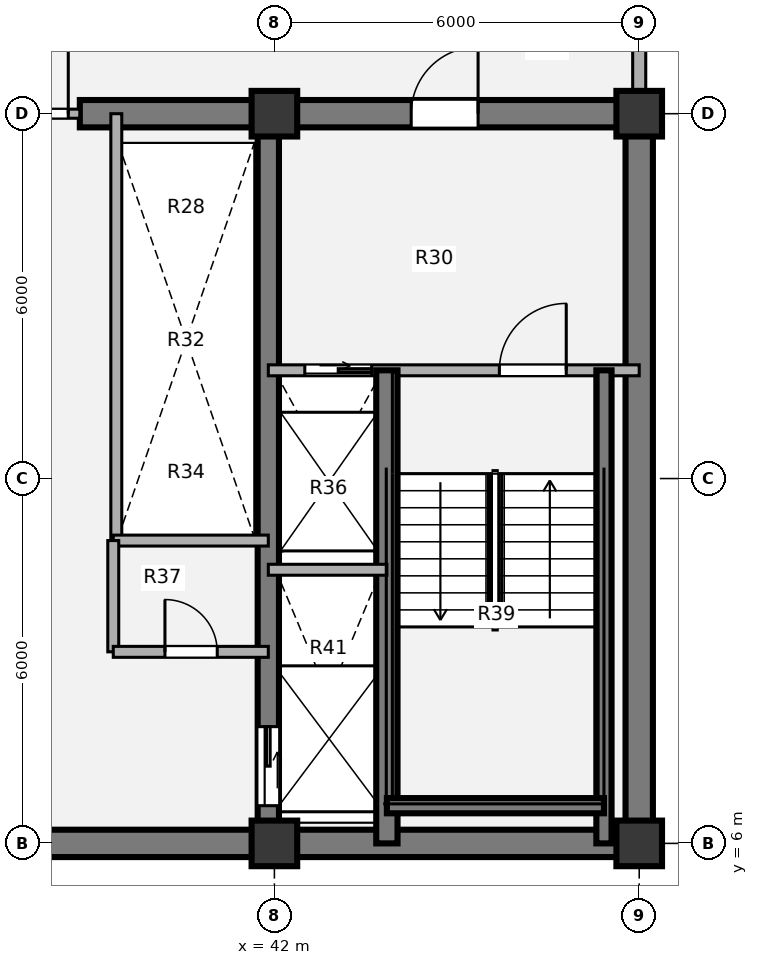
"""IFC4 building model, lengths in metres.
Left out: names, types, materials, properties, quantities, classifications, styles, units other than length and angle.
Written with IfcOpenShell. Run it as: python <this file> out.ifc"""

import sys

from ifc_helpers import new_model, si_unit, direction, frame, frame_2d, origin, origin_2d, place, context, subcontext, project, spatial, rectangle, extrude, source, transform, mapped, element, fill, save


model = new_model("IFC4")
c1 = context("Model", 3, precision=1e-05, world=origin(), true_north=direction((0.0, 1.0)))
c2 = subcontext(c1, "Body", "Model", "MODEL_VIEW")
j1 = project(units=[si_unit("LENGTHUNIT", "METRE"), si_unit("PLANEANGLEUNIT", "RADIAN")], contexts=[c1])
p1 = place(None, origin())
s1 = spatial("IfcSite", under=j1, at=p1, CompositionType="ELEMENT")
p2 = place(p1, origin())
s2 = spatial("IfcBuilding", under=s1, at=p2, CompositionType="ELEMENT")
p3 = place(p2, frame((0.0, 0.0, 194.22)))
s3 = spatial("IfcBuildingStorey", under=s2, at=p3, CompositionType="ELEMENT", Elevation=194.22)
m1 = source(origin(), c2, "Body", "SweptSolid", [
    extrude(rectangle(XDim=0.75, YDim=0.75, at=origin_2d()), origin(), (0.0, 0.0, 1.0), 3.78),
])
for number, where, z_axis, x_axis in (
    (1, (42.0, 6.0, 0.0), (0.0, 0.0, 1.0), (1.0, 0.0, 0.0)),
    (2, (48.0, 6.0, 0.0), (0.0, 0.0, 1.0), (1.0, 0.0, 0.0)),
    (3, (42.0, 18.0, 0.0), (0.0, 0.0, 1.0), (1.0, 0.0, 0.0)),
    (4, (48.0, 18.0, 0.0), (0.0, 0.0, 1.0), (1.0, 0.0, 0.0)),
):
    element("IfcColumn", number, at=place(p3, frame(where, z_axis=z_axis, x_axis=x_axis)), inside=s3, PredefinedType="COLUMN", context=c2, shape_type="MappedRepresentation", body=[
        mapped(m1, transform((0.0, 0.0, 0.0), x_axis=(1.0, 0.0, 0.0), y_axis=(0.0, 1.0, 0.0), z_axis=(0.0, 0.0, 1.0), scale=1.0)),
    ])
p4 = place(p3, frame((48.225, 6.0, 0.0), z_axis=(0.0, 0.0, 1.0), x_axis=(-1.0, 0.0, 0.0)))
e5 = element("IfcWall", 5, at=p4, inside=s3, PredefinedType="SHEAR", context=c2, shape_type="SweptSolid", body=[
    extrude(rectangle(XDim=24.45, YDim=0.45, at=frame_2d((12.225, 0.0))), origin(), (0.0, 0.0, 1.0), 3.78),
])
p5 = place(p3, frame((48.0, 18.0, 0.0), z_axis=(0.0, 0.0, 1.0), x_axis=(0.0, -1.0, 0.0)))
e6 = element("IfcWall", 6, at=p5, inside=s3, PredefinedType="SHEAR", context=c2, shape_type="SweptSolid", body=[
    extrude(rectangle(XDim=12.0, YDim=0.45, at=frame_2d((6.0, 0.0))), origin(), (0.0, 0.0, 1.0), 3.78),
])
p6 = place(p3, frame((38.8, 18.0, 0.0), z_axis=(0.0, 0.0, 1.0), x_axis=(1.0, 0.0, 0.0)))
e7 = element("IfcWall", 7, at=p6, inside=s3, PredefinedType="SHEAR", context=c2, shape_type="SweptSolid", body=[
    extrude(rectangle(XDim=9.425, YDim=0.45, at=frame_2d((4.712, 0.0))), origin(), (0.0, 0.0, 1.0), 3.78),
])
p7 = place(p6, frame((5.45, 0.0, 0.0)))
e8 = element("IfcOpeningElement", 8, at=p7, cuts=e7, PredefinedType="OPENING", context=c2, shape_type="SweptSolid", body=[
    extrude(rectangle(XDim=1.1, YDim=2.1, at=origin_2d()), frame((0.55, 0.235, 1.05), z_axis=(0.0, -1.0, 0.0), x_axis=(1.0, 0.0, 0.0)), (0.0, 0.0, 1.0), 0.47),
])
p8 = place(p3, frame((41.9, 18.0, 0.0), z_axis=(0.0, 0.0, 1.0), x_axis=(0.0, -1.0, 0.0)))
e9 = element("IfcWall", 9, at=p8, inside=s3, PredefinedType="SHEAR", context=c2, shape_type="SweptSolid", body=[
    extrude(rectangle(XDim=12.0, YDim=0.35, at=frame_2d((6.0, 0.0))), origin(), (0.0, 0.0, 1.0), 3.78),
])
p9 = place(p8, frame((10.08, 0.0, 0.0)))
e10 = element("IfcOpeningElement", 10, at=p9, cuts=e9, PredefinedType="OPENING", context=c2, shape_type="SweptSolid", body=[
    extrude(rectangle(XDim=1.3, YDim=2.1, at=origin_2d()), frame((0.65, 0.185, 1.05), z_axis=(0.0, -1.0, 0.0), x_axis=(1.0, 0.0, 0.0)), (0.0, 0.0, 1.0), 0.37),
])
p10 = place(p3, frame((48.0, 21.05, 0.0), z_axis=(0.0, 0.0, 1.0), x_axis=(0.0, -1.0, 0.0)))
e11 = element("IfcWall", 11, at=p10, inside=s3, PredefinedType="SOLIDWALL", context=c2, shape_type="SweptSolid", body=[
    extrude(rectangle(XDim=2.695, YDim=0.215, at=frame_2d((1.348, 0.0))), origin(), (0.0, 0.0, 1.0), 2.718),
])
p11 = place(p3, frame((39.4, 11.0, 0.0), z_axis=(0.0, 0.0, 1.0), x_axis=(0.0, 1.0, 0.0)))
e12 = element("IfcWall", 12, at=p11, inside=s3, PredefinedType="PARTITIONING", context=c2, shape_type="SweptSolid", body=[
    extrude(rectangle(XDim=7.0, YDim=0.18, at=frame_2d((3.5, 0.0))), origin(), (0.0, 0.0, 1.0), 3.5),
])
p12 = place(p3, frame((39.35, 10.98, 0.0), z_axis=(0.0, 0.0, 1.0), x_axis=(1.0, 0.0, 0.0)))
e13 = element("IfcWall", 13, at=p12, inside=s3, PredefinedType="PARTITIONING", context=c2, shape_type="SweptSolid", body=[
    extrude(rectangle(XDim=2.55, YDim=0.18, at=frame_2d((1.275, 0.0))), origin(), (0.0, 0.0, 1.0), 3.5),
])
p13 = place(p3, frame((39.35, 9.15, 0.0), z_axis=(0.0, 0.0, 1.0), x_axis=(0.0, 1.0, 0.0)))
e14 = element("IfcWall", 14, at=p13, inside=s3, PredefinedType="PARTITIONING", context=c2, shape_type="SweptSolid", body=[
    extrude(rectangle(XDim=1.83, YDim=0.18, at=frame_2d((0.915, 0.0))), origin(), (0.0, 0.0, 1.0), 3.5),
])
p14 = place(p3, frame((39.35, 9.15, 0.0), z_axis=(0.0, 0.0, 1.0), x_axis=(1.0, 0.0, 0.0)))
e15 = element("IfcWall", 15, at=p14, inside=s3, PredefinedType="PARTITIONING", context=c2, shape_type="SweptSolid", body=[
    extrude(rectangle(XDim=2.55, YDim=0.18, at=frame_2d((1.275, 0.0))), origin(), (0.0, 0.0, 1.0), 3.5),
])
p15 = place(p14, frame((0.85, 0.0, 0.0)))
e16 = element("IfcOpeningElement", 16, at=p15, cuts=e15, PredefinedType="OPENING", context=c2, shape_type="SweptSolid", body=[
    extrude(rectangle(XDim=0.86, YDim=2.1, at=origin_2d()), frame((0.43, 0.1, 1.05), z_axis=(0.0, -1.0, 0.0), x_axis=(1.0, 0.0, 0.0)), (0.0, 0.0, 1.0), 0.2),
])
p16 = place(p3, frame((33.2, 18.0, 0.0), z_axis=(0.0, 0.0, 1.0), x_axis=(1.0, 0.0, 0.0)))
e17 = element("IfcWall", 17, at=p16, inside=s3, PredefinedType="PARTITIONING", context=c2, shape_type="SweptSolid", body=[
    extrude(rectangle(XDim=5.6, YDim=0.15, at=frame_2d((2.8, 0.0))), origin(), (0.0, 0.0, 1.0), 2.515),
])
p17 = place(p16, frame((0.19, 0.0, 0.0)))
e18 = element("IfcOpeningElement", 18, at=p17, cuts=e17, PredefinedType="OPENING", context=c2, shape_type="SweptSolid", body=[
    extrude(rectangle(XDim=1.1, YDim=2.1, at=origin_2d()), frame((0.55, 0.085, 1.05), z_axis=(0.0, -1.0, 0.0), x_axis=(1.0, 0.0, 0.0)), (0.0, 0.0, 1.0), 0.17),
])
p18 = place(p16, frame((4.31, 0.0, 0.0)))
e19 = element("IfcOpeningElement", 19, at=p18, cuts=e17, PredefinedType="OPENING", context=c2, shape_type="SweptSolid", body=[
    extrude(rectangle(XDim=1.1, YDim=2.1, at=origin_2d()), frame((0.55, 0.085, 1.05), z_axis=(0.0, -1.0, 0.0), x_axis=(1.0, 0.0, 0.0)), (0.0, 0.0, 1.0), 0.17),
])
p19 = place(p3, frame((41.9, 13.78, 0.0), z_axis=(0.0, 0.0, 1.0), x_axis=(1.0, 0.0, 0.0)))
e20 = element("IfcWall", 20, at=p19, inside=s3, PredefinedType="PARTITIONING", context=c2, shape_type="SweptSolid", body=[
    extrude(rectangle(XDim=6.1, YDim=0.18, at=frame_2d((3.05, 0.0))), origin(), (0.0, 0.0, 1.0), 3.5),
])
p20 = place(p19, frame((0.6, 0.0, 0.0)))
e21 = element("IfcOpeningElement", 21, at=p20, cuts=e20, PredefinedType="OPENING", context=c2, shape_type="SweptSolid", body=[
    extrude(rectangle(XDim=1.1, YDim=2.1, at=origin_2d()), frame((0.55, 0.1, 1.05), z_axis=(0.0, -1.0, 0.0), x_axis=(1.0, 0.0, 0.0)), (0.0, 0.0, 1.0), 0.2),
])
p21 = place(p19, frame((3.8, 0.0, 0.0)))
e22 = element("IfcOpeningElement", 22, at=p21, cuts=e20, PredefinedType="OPENING", context=c2, shape_type="SweptSolid", body=[
    extrude(rectangle(XDim=1.1, YDim=2.1, at=origin_2d()), frame((0.55, 0.1, 1.05), z_axis=(0.0, -1.0, 0.0), x_axis=(1.0, 0.0, 0.0)), (0.0, 0.0, 1.0), 0.2),
])
p22 = place(p3, frame((43.85, 6.0, 0.0), z_axis=(0.0, 0.0, 1.0), x_axis=(0.0, 1.0, 0.0)))
e23 = element("IfcWall", 23, at=p22, inside=s3, PredefinedType="SHEAR", context=c2, shape_type="SweptSolid", body=[
    extrude(rectangle(XDim=7.78, YDim=0.35, at=frame_2d((3.89, 0.0))), origin(), (0.0, 0.0, 1.0), 3.85),
])
p23 = place(p3, frame((47.42, 6.0, 0.0), z_axis=(0.0, 0.0, 1.0), x_axis=(0.0, 1.0, 0.0)))
e24 = element("IfcWall", 24, at=p23, inside=s3, PredefinedType="SHEAR", context=c2, shape_type="SweptSolid", body=[
    extrude(rectangle(XDim=7.78, YDim=0.25, at=frame_2d((3.89, 0.0))), origin(), (0.0, 0.0, 1.0), 3.85),
])
p24 = place(p3, frame((43.85, 6.62, 0.0), z_axis=(0.0, 0.0, 1.0), x_axis=(1.0, 0.0, 0.0)))
e25 = element("IfcWall", 25, at=p24, inside=s3, PredefinedType="SHEAR", context=c2, shape_type="SweptSolid", body=[
    extrude(rectangle(XDim=3.57, YDim=0.25, at=frame_2d((1.785, 0.0))), origin(), (0.0, 0.0, 1.0), 3.85),
])
p25 = place(p3, frame((41.9, 10.5, 0.0), z_axis=(0.0, 0.0, 1.0), x_axis=(1.0, 0.0, 0.0)))
e26 = element("IfcWall", 26, at=p25, inside=s3, PredefinedType="PARTITIONING", context=c2, shape_type="SweptSolid", body=[
    extrude(rectangle(XDim=1.95, YDim=0.18, at=frame_2d((0.975, 0.0))), origin(), (0.0, 0.0, 1.0), 3.5),
])
m2 = source(origin(), c2, "Body", "SweptSolid", [
    extrude(rectangle(XDim=0.86, YDim=2.1, at=origin_2d()), frame((0.43, 0.025, 1.05), z_axis=(0.0, -1.0, 0.0), x_axis=(1.0, 0.0, 0.0)), (0.0, 0.0, 1.0), 0.05),
])
p26 = place(p15, origin())
e27 = element("IfcDoor", 27, at=p26, inside=s3, OperationType="SINGLE_SWING_LEFT", PredefinedType="DOOR", context=c2, shape_type="MappedRepresentation", body=[
    mapped(m2, transform((0.0, 0.0, 0.0), x_axis=(1.0, 0.0, 0.0), y_axis=(0.0, 1.0, 0.0), z_axis=(0.0, 0.0, 1.0), scale=1.0)),
])
fill(e16, e27)
m3 = source(origin(), c2, "Body", "SweptSolid", [
    extrude(rectangle(XDim=1.1, YDim=2.1, at=origin_2d()), frame((0.55, 0.025, 1.05), z_axis=(0.0, -1.0, 0.0), x_axis=(1.0, 0.0, 0.0)), (0.0, 0.0, 1.0), 0.05),
])
p27 = place(p18, origin())
e28 = element("IfcDoor", 28, at=p27, inside=s3, OperationType="SINGLE_SWING_RIGHT", PredefinedType="DOOR", context=c2, shape_type="MappedRepresentation", body=[
    mapped(m3, transform((0.0, 0.0, 0.0), x_axis=(1.0, 0.0, 0.0), y_axis=(0.0, 1.0, 0.0), z_axis=(0.0, 0.0, 1.0), scale=1.0)),
])
fill(e19, e28)
m4 = source(origin(), c2, "Body", "SweptSolid", [
    extrude(rectangle(XDim=1.1, YDim=2.1, at=origin_2d()), frame((0.55, 0.025, 1.05), z_axis=(0.0, -1.0, 0.0), x_axis=(1.0, 0.0, 0.0)), (0.0, 0.0, 1.0), 0.05),
])
p28 = place(p20, origin())
e29 = element("IfcDoor", 29, at=p28, inside=s3, OperationType="SLIDING_TO_RIGHT", PredefinedType="DOOR", context=c2, shape_type="MappedRepresentation", body=[
    mapped(m4, transform((0.0, 0.0, 0.0), x_axis=(1.0, 0.0, 0.0), y_axis=(0.0, 1.0, 0.0), z_axis=(0.0, 0.0, 1.0), scale=1.0)),
])
fill(e21, e29)
m5 = source(origin(), c2, "Body", "SweptSolid", [
    extrude(rectangle(XDim=1.1, YDim=2.1, at=origin_2d()), frame((0.55, 0.025, 1.05), z_axis=(0.0, -1.0, 0.0), x_axis=(1.0, 0.0, 0.0)), (0.0, 0.0, 1.0), 0.05),
])
p29 = place(p21, origin())
e30 = element("IfcDoor", 30, at=p29, inside=s3, OperationType="SINGLE_SWING_RIGHT", PredefinedType="DOOR", context=c2, shape_type="MappedRepresentation", body=[
    mapped(m5, transform((0.0, 0.0, 0.0), x_axis=(1.0, 0.0, 0.0), y_axis=(0.0, 1.0, 0.0), z_axis=(0.0, 0.0, 1.0), scale=1.0)),
])
fill(e22, e30)
m6 = source(origin(), c2, "Body", "SweptSolid", [
    extrude(rectangle(XDim=1.3, YDim=2.1, at=origin_2d()), frame((0.65, 0.025, 1.05), z_axis=(0.0, -1.0, 0.0), x_axis=(1.0, 0.0, 0.0)), (0.0, 0.0, 1.0), 0.05),
])
p30 = place(p9, origin())
e31 = element("IfcDoor", 31, at=p30, inside=s3, OperationType="SLIDING_TO_LEFT", PredefinedType="DOOR", context=c2, shape_type="MappedRepresentation", body=[
    mapped(m6, transform((0.0, 0.0, 0.0), x_axis=(1.0, 0.0, 0.0), y_axis=(0.0, 1.0, 0.0), z_axis=(0.0, 0.0, 1.0), scale=1.0)),
])
fill(e10, e31)
p31 = place(p7, origin())
e32 = element("IfcDoor", 32, at=p31, inside=s3, OperationType="SINGLE_SWING_RIGHT", PredefinedType="DOOR", context=c2, shape_type="MappedRepresentation", body=[
    mapped(m3, transform((0.0, 0.0, 0.0), x_axis=(1.0, 0.0, 0.0), y_axis=(0.0, 1.0, 0.0), z_axis=(0.0, 0.0, 1.0), scale=1.0)),
])
fill(e8, e32)
save(model, sys.argv[1])
